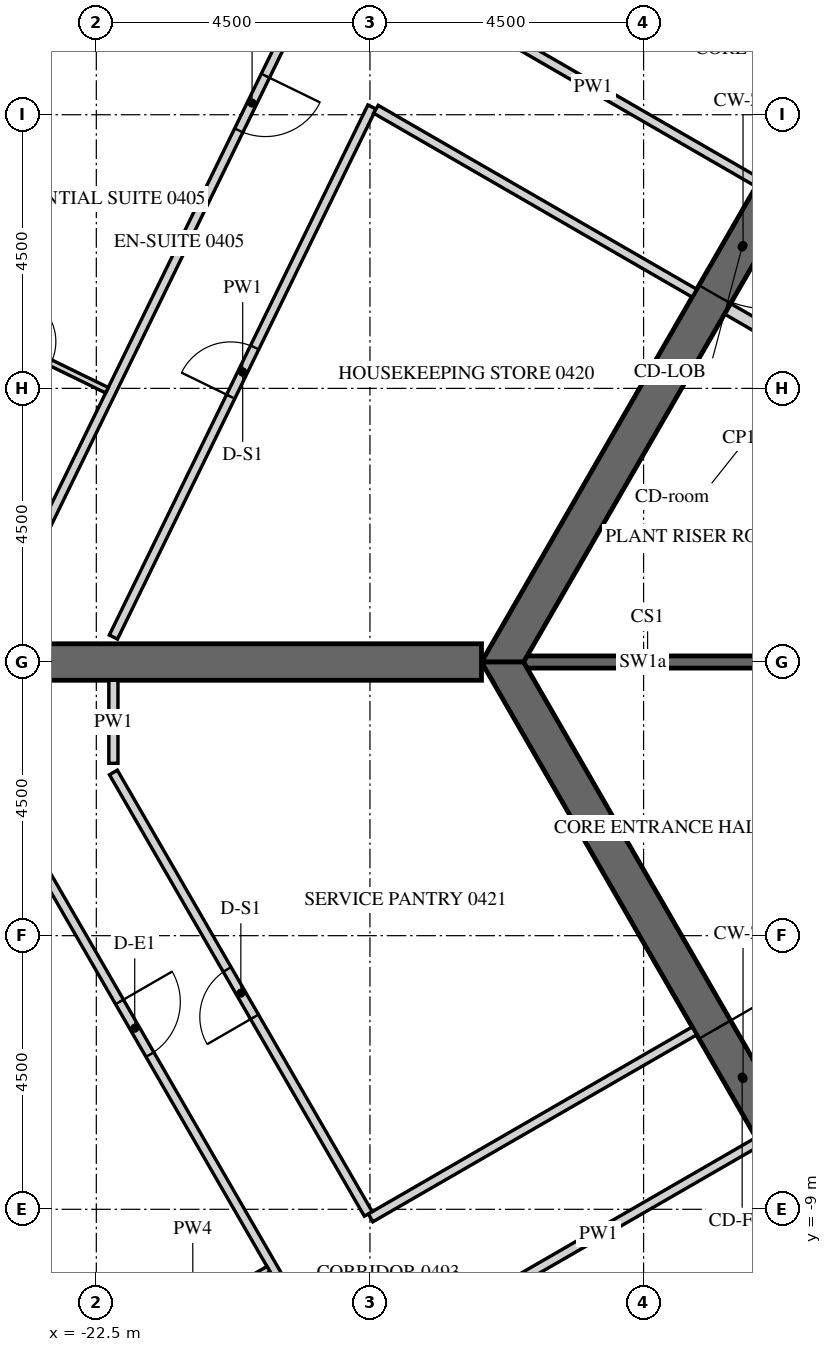
"""IFC4 building model, lengths in metres.
Left out: names, types, materials, properties, quantities, classifications, styles, units other than length and angle.
Written with IfcOpenShell. Run it as: python <this file> out.ifc"""

import sys

from ifc_helpers import new_model, si_unit, direction, frame, frame_2d, origin, place, context, subcontext, project, spatial, polyline, rectangle, outline, extrude, element, fill, save


model = new_model("IFC4")
c1 = context("Model", 3, precision=1e-05, world=origin(), true_north=direction((0.0, 1.0)))
c2 = subcontext(c1, "Body", "Model", "MODEL_VIEW")
j1 = project(units=[si_unit("LENGTHUNIT", "METRE"), si_unit("PLANEANGLEUNIT", "RADIAN")], contexts=[c1])
p1 = place(None, origin())
s1 = spatial("IfcSite", under=j1, at=p1, CompositionType="ELEMENT")
p2 = place(p1, origin())
s2 = spatial("IfcBuilding", under=s1, at=p2, CompositionType="ELEMENT")
p3 = place(p2, frame((0.0, 0.0, 68.7)))
s3 = spatial("IfcBuildingStorey", under=s2, at=p3, CompositionType="ELEMENT", Elevation=68.7)
p4 = place(p3, frame((-19.595, 27.633, -0.15), z_axis=(0.0, 0.0, 1.0), x_axis=(-0.438368285794, -0.898795441694, 0.0)))
e1 = element("IfcWall", 1, at=p4, inside=s3, PredefinedType="SOLIDWALL", context=c2, shape_type="SweptSolid", body=[
    extrude(outline(polyline([(-0.026, -0.275), (30.093, -0.275), (30.048, 0.275), (0.026, 0.275), (-0.026, -0.275)])), origin(), (0.0, 0.0, 1.0), 3.9),
])
p5 = place(p4, frame((1.236, 0.0, 1.05)))
e2 = element("IfcOpeningElement", 2, at=p5, cuts=e1, PredefinedType="OPENING", context=c2, shape_type="SweptSolid", body=[
    extrude(rectangle(XDim=2.4, YDim=2.4, at=frame_2d((1.2, 1.2))), frame((0.0, 0.285, 0.0), z_axis=(0.0, -1.0, 0.0), x_axis=(1.0, 0.0, 0.0)), (0.0, 0.0, 1.0), 0.57),
])
p6 = place(p4, frame((4.835, 0.0, 1.05)))
e3 = element("IfcOpeningElement", 3, at=p6, cuts=e1, PredefinedType="OPENING", context=c2, shape_type="SweptSolid", body=[
    extrude(rectangle(XDim=2.4, YDim=2.4, at=frame_2d((1.2, 1.2))), frame((0.0, 0.285, 0.0), z_axis=(0.0, -1.0, 0.0), x_axis=(1.0, 0.0, 0.0)), (0.0, 0.0, 1.0), 0.57),
])
p7 = place(p4, frame((8.436, 0.0, 1.05)))
e4 = element("IfcOpeningElement", 4, at=p7, cuts=e1, PredefinedType="OPENING", context=c2, shape_type="SweptSolid", body=[
    extrude(rectangle(XDim=2.4, YDim=2.4, at=frame_2d((1.2, 1.2))), frame((0.0, 0.285, 0.0), z_axis=(0.0, -1.0, 0.0), x_axis=(1.0, 0.0, 0.0)), (0.0, 0.0, 1.0), 0.57),
])
p8 = place(p4, frame((12.035, 0.0, 1.05)))
e5 = element("IfcOpeningElement", 5, at=p8, cuts=e1, PredefinedType="OPENING", context=c2, shape_type="SweptSolid", body=[
    extrude(rectangle(XDim=2.4, YDim=2.4, at=frame_2d((1.2, 1.2))), frame((0.0, 0.285, 0.0), z_axis=(0.0, -1.0, 0.0), x_axis=(1.0, 0.0, 0.0)), (0.0, 0.0, 1.0), 0.57),
])
p9 = place(p4, frame((15.635, 0.0, 1.05)))
e6 = element("IfcOpeningElement", 6, at=p9, cuts=e1, PredefinedType="OPENING", context=c2, shape_type="SweptSolid", body=[
    extrude(rectangle(XDim=2.4, YDim=2.4, at=frame_2d((1.2, 1.2))), frame((0.0, 0.285, 0.0), z_axis=(0.0, -1.0, 0.0), x_axis=(1.0, 0.0, 0.0)), (0.0, 0.0, 1.0), 0.57),
])
p10 = place(p4, frame((19.236, 0.0, 1.05)))
e7 = element("IfcOpeningElement", 7, at=p10, cuts=e1, PredefinedType="OPENING", context=c2, shape_type="SweptSolid", body=[
    extrude(rectangle(XDim=2.4, YDim=2.4, at=frame_2d((1.2, 1.2))), frame((0.0, 0.285, 0.0), z_axis=(0.0, -1.0, 0.0), x_axis=(1.0, 0.0, 0.0)), (0.0, 0.0, 1.0), 0.57),
])
p11 = place(p4, frame((22.835, 0.0, 1.05)))
e8 = element("IfcOpeningElement", 8, at=p11, cuts=e1, PredefinedType="OPENING", context=c2, shape_type="SweptSolid", body=[
    extrude(rectangle(XDim=2.4, YDim=2.4, at=frame_2d((1.2, 1.2))), frame((0.0, 0.285, 0.0), z_axis=(0.0, -1.0, 0.0), x_axis=(1.0, 0.0, 0.0)), (0.0, 0.0, 1.0), 0.57),
])
p12 = place(p4, frame((26.436, 0.0, 1.05)))
e9 = element("IfcOpeningElement", 9, at=p12, cuts=e1, PredefinedType="OPENING", context=c2, shape_type="SweptSolid", body=[
    extrude(rectangle(XDim=2.4, YDim=2.4, at=frame_2d((1.2, 1.2))), frame((0.0, 0.285, 0.0), z_axis=(0.0, -1.0, 0.0), x_axis=(1.0, 0.0, 0.0)), (0.0, 0.0, 1.0), 0.57),
])
p13 = place(p3, frame((-32.655, -2.89, -0.15), z_axis=(0.0, 0.0, 1.0), x_axis=(0.499997711317, -0.866026725152, 0.0)))
e10 = element("IfcWall", 10, at=p13, inside=s3, PredefinedType="SOLIDWALL", context=c2, shape_type="SweptSolid", body=[
    extrude(outline(polyline([(-0.022, -0.275), (30.097, -0.275), (30.045, 0.275), (0.022, 0.275), (-0.022, -0.275)])), origin(), (0.0, 0.0, 1.0), 3.9),
])
p14 = place(p13, frame((1.236, 0.0, 1.05)))
e11 = element("IfcOpeningElement", 11, at=p14, cuts=e10, PredefinedType="OPENING", context=c2, shape_type="SweptSolid", body=[
    extrude(rectangle(XDim=2.4, YDim=2.4, at=frame_2d((1.2, 1.2))), frame((0.0, 0.285, 0.0), z_axis=(0.0, -1.0, 0.0), x_axis=(1.0, 0.0, 0.0)), (0.0, 0.0, 1.0), 0.57),
])
p15 = place(p13, frame((4.835, 0.0, 1.05)))
e12 = element("IfcOpeningElement", 12, at=p15, cuts=e10, PredefinedType="OPENING", context=c2, shape_type="SweptSolid", body=[
    extrude(rectangle(XDim=2.4, YDim=2.4, at=frame_2d((1.2, 1.2))), frame((0.0, 0.285, 0.0), z_axis=(0.0, -1.0, 0.0), x_axis=(1.0, 0.0, 0.0)), (0.0, 0.0, 1.0), 0.57),
])
p16 = place(p13, frame((8.436, 0.0, 1.05)))
e13 = element("IfcOpeningElement", 13, at=p16, cuts=e10, PredefinedType="OPENING", context=c2, shape_type="SweptSolid", body=[
    extrude(rectangle(XDim=2.4, YDim=2.4, at=frame_2d((1.2, 1.2))), frame((0.0, 0.285, 0.0), z_axis=(0.0, -1.0, 0.0), x_axis=(1.0, 0.0, 0.0)), (0.0, 0.0, 1.0), 0.57),
])
p17 = place(p13, frame((12.035, 0.0, 1.05)))
e14 = element("IfcOpeningElement", 14, at=p17, cuts=e10, PredefinedType="OPENING", context=c2, shape_type="SweptSolid", body=[
    extrude(rectangle(XDim=2.4, YDim=2.4, at=frame_2d((1.2, 1.2))), frame((0.0, 0.285, 0.0), z_axis=(0.0, -1.0, 0.0), x_axis=(1.0, 0.0, 0.0)), (0.0, 0.0, 1.0), 0.57),
])
p18 = place(p13, frame((15.635, 0.0, 1.05)))
e15 = element("IfcOpeningElement", 15, at=p18, cuts=e10, PredefinedType="OPENING", context=c2, shape_type="SweptSolid", body=[
    extrude(rectangle(XDim=2.4, YDim=2.4, at=frame_2d((1.2, 1.2))), frame((0.0, 0.285, 0.0), z_axis=(0.0, -1.0, 0.0), x_axis=(1.0, 0.0, 0.0)), (0.0, 0.0, 1.0), 0.57),
])
p19 = place(p13, frame((19.236, 0.0, 1.05)))
e16 = element("IfcOpeningElement", 16, at=p19, cuts=e10, PredefinedType="OPENING", context=c2, shape_type="SweptSolid", body=[
    extrude(rectangle(XDim=2.4, YDim=2.4, at=frame_2d((1.2, 1.2))), frame((0.0, 0.285, 0.0), z_axis=(0.0, -1.0, 0.0), x_axis=(1.0, 0.0, 0.0)), (0.0, 0.0, 1.0), 0.57),
])
p20 = place(p13, frame((22.835, 0.0, 1.05)))
e17 = element("IfcOpeningElement", 17, at=p20, cuts=e10, PredefinedType="OPENING", context=c2, shape_type="SweptSolid", body=[
    extrude(rectangle(XDim=2.4, YDim=2.4, at=frame_2d((1.2, 1.2))), frame((0.0, 0.285, 0.0), z_axis=(0.0, -1.0, 0.0), x_axis=(1.0, 0.0, 0.0)), (0.0, 0.0, 1.0), 0.57),
])
p21 = place(p13, frame((26.436, 0.0, 1.05)))
e18 = element("IfcOpeningElement", 18, at=p21, cuts=e10, PredefinedType="OPENING", context=c2, shape_type="SweptSolid", body=[
    extrude(rectangle(XDim=2.4, YDim=2.4, at=frame_2d((1.2, 1.2))), frame((0.0, 0.285, 0.0), z_axis=(0.0, -1.0, 0.0), x_axis=(1.0, 0.0, 0.0)), (0.0, 0.0, 1.0), 0.57),
])
p22 = place(p3, frame((-7.91, 13.7, -0.15), z_axis=(0.0, 0.0, 1.0), x_axis=(-0.499999880136, -0.866025472988, 0.0)))
e19 = element("IfcWall", 19, at=p22, inside=s3, PredefinedType="SHEAR", context=c2, shape_type="SweptSolid", body=[
    extrude(outline(polyline([(-0.173, -0.3), (15.993, -0.3), (15.646, 0.3), (0.173, 0.3), (-0.173, -0.3)])), origin(), (0.0, 0.0, 1.0), 3.9),
])
p23 = place(p22, frame((7.039, 0.0, 0.15)))
e20 = element("IfcOpeningElement", 20, at=p23, cuts=e19, PredefinedType="OPENING", context=c2, shape_type="SweptSolid", body=[
    extrude(rectangle(XDim=1.8, YDim=2.4, at=frame_2d((0.9, 1.2))), frame((0.0, 0.31, 0.0), z_axis=(0.0, -1.0, 0.0), x_axis=(1.0, 0.0, 0.0)), (0.0, 0.0, 1.0), 0.62),
])
p24 = place(p3, frame((-15.819, 0.0, -0.15), z_axis=(0.0, 0.0, 1.0), x_axis=(0.499999880136, -0.866025472988, 0.0)))
e21 = element("IfcWall", 21, at=p24, inside=s3, PredefinedType="SHEAR", context=c2, shape_type="SweptSolid", body=[
    extrude(outline(polyline([(-0.173, -0.3), (15.993, -0.3), (15.646, 0.3), (0.173, 0.3), (-0.173, -0.3)])), origin(), (0.0, 0.0, 1.0), 3.9),
])
p25 = place(p24, frame((6.981, 0.0, 0.15)))
e22 = element("IfcOpeningElement", 22, at=p25, cuts=e21, PredefinedType="OPENING", context=c2, shape_type="SweptSolid", body=[
    extrude(rectangle(XDim=1.8, YDim=2.4, at=frame_2d((0.9, 1.2))), frame((0.0, 0.31, 0.0), z_axis=(0.0, -1.0, 0.0), x_axis=(1.0, 0.0, 0.0)), (0.0, 0.0, 1.0), 0.62),
])
p26 = place(p3, frame((-16.166, 0.0, -0.15), z_axis=(0.0, 0.0, 1.0), x_axis=(-1.0, 0.0, 0.0)))
e23 = element("IfcWall", 23, at=p26, inside=s3, PredefinedType="SHEAR", context=c2, shape_type="SweptSolid", body=[
    extrude(rectangle(XDim=16.509, YDim=0.6, at=frame_2d((8.254, 0.0))), origin(), (0.0, 0.0, 1.0), 3.9),
])
p27 = place(p26, frame((7.354, 0.0, 0.15)))
e24 = element("IfcOpeningElement", 24, at=p27, cuts=e23, PredefinedType="OPENING", context=c2, shape_type="SweptSolid", body=[
    extrude(rectangle(XDim=1.8, YDim=2.4, at=frame_2d((0.9, 1.2))), frame((0.0, 0.31, 0.0), z_axis=(0.0, -1.0, 0.0), x_axis=(1.0, 0.0, 0.0)), (0.0, 0.0, 1.0), 0.62),
])
p28 = place(p3, frame((-11.547, 0.0, -0.15), z_axis=(0.0, 0.0, 1.0), x_axis=(-1.0, 0.0, 0.0)))
e25 = element("IfcWall", 25, at=p28, inside=s3, PredefinedType="SHEAR", context=c2, shape_type="SweptSolid", body=[
    extrude(rectangle(XDim=3.926, YDim=0.2, at=frame_2d((1.963, 0.0))), origin(), (0.0, 0.0, 1.0), 3.9),
])
p29 = place(p3, frame((-9.175, 4.109, 0.0), z_axis=(0.0, 0.0, 1.0), x_axis=(-0.865989465428, 0.500062241894, 0.0)))
e26 = element("IfcWall", 26, at=p29, inside=s3, PredefinedType="PARTITIONING", context=c2, shape_type="SweptSolid", body=[
    extrude(rectangle(XDim=3.4, YDim=0.2, at=frame_2d((1.7, 0.0))), origin(), (0.0, 0.0, 1.0), 3.65),
])
p30 = place(p29, frame((1.351, 0.0, 0.0)))
e27 = element("IfcOpeningElement", 27, at=p30, cuts=e26, PredefinedType="OPENING", context=c2, shape_type="SweptSolid", body=[
    extrude(rectangle(XDim=0.9, YDim=2.1, at=frame_2d((0.45, 1.05))), frame((0.0, 0.11, 0.0), z_axis=(0.0, -1.0, 0.0), x_axis=(1.0, 0.0, 0.0)), (0.0, 0.0, 1.0), 0.22),
])
p31 = place(p3, frame((-13.752, 21.875, 0.0), z_axis=(0.0, 0.0, 1.0), x_axis=(-0.438374473378, -0.898792423806, 0.0)))
e28 = element("IfcWall", 28, at=p31, inside=s3, PredefinedType="PARTITIONING", context=c2, shape_type="SweptSolid", body=[
    extrude(rectangle(XDim=21.918, YDim=0.15, at=frame_2d((10.959, 0.0))), origin(), (0.0, 0.0, 1.0), 2.988),
])
p32 = place(p31, frame((0.371, 0.0, 0.0)))
e29 = element("IfcOpeningElement", 29, at=p32, cuts=e28, PredefinedType="OPENING", context=c2, shape_type="SweptSolid", body=[
    extrude(rectangle(XDim=1.0, YDim=2.1, at=frame_2d((0.5, 1.05))), frame((0.0, 0.085, 0.0), z_axis=(0.0, -1.0, 0.0), x_axis=(1.0, 0.0, 0.0)), (0.0, 0.0, 1.0), 0.17),
])
p33 = place(p31, frame((6.171, 0.0, 0.0)))
e30 = element("IfcOpeningElement", 30, at=p33, cuts=e28, PredefinedType="OPENING", context=c2, shape_type="SweptSolid", body=[
    extrude(rectangle(XDim=1.0, YDim=2.1, at=frame_2d((0.5, 1.05))), frame((0.0, 0.085, 0.0), z_axis=(0.0, -1.0, 0.0), x_axis=(1.0, 0.0, 0.0)), (0.0, 0.0, 1.0), 0.17),
])
p34 = place(p31, frame((13.612, 0.0, 0.0)))
e31 = element("IfcOpeningElement", 31, at=p34, cuts=e28, PredefinedType="OPENING", context=c2, shape_type="SweptSolid", body=[
    extrude(rectangle(XDim=1.0, YDim=2.1, at=frame_2d((0.5, 1.05))), frame((0.0, 0.085, 0.0), z_axis=(0.0, -1.0, 0.0), x_axis=(1.0, 0.0, 0.0)), (0.0, 0.0, 1.0), 0.17),
])
p35 = place(p3, frame((-11.614, 7.884, 0.0), z_axis=(0.0, 0.0, 1.0), x_axis=(-0.866025438137, 0.4999999405, 0.0)))
e32 = element("IfcWall", 32, at=p35, inside=s3, PredefinedType="PARTITIONING", context=c2, shape_type="SweptSolid", body=[
    extrude(rectangle(XDim=6.271, YDim=0.15, at=frame_2d((3.135, 0.0))), origin(), (0.0, 0.0, 1.0), 2.988),
])
p36 = place(p3, frame((-22.219, 0.41, 0.0), z_axis=(0.0, 0.0, 1.0), x_axis=(0.438391891827, 0.898783927972, 0.0)))
e33 = element("IfcWall", 33, at=p36, inside=s3, PredefinedType="PARTITIONING", context=c2, shape_type="SweptSolid", body=[
    extrude(rectangle(XDim=9.699, YDim=0.15, at=frame_2d((4.85, 0.0))), origin(), (0.0, 0.0, 1.0), 2.988),
])
p37 = place(p36, frame((4.4, 0.0, 0.0)))
e34 = element("IfcOpeningElement", 34, at=p37, cuts=e33, PredefinedType="OPENING", context=c2, shape_type="SweptSolid", body=[
    extrude(rectangle(XDim=0.9, YDim=2.1, at=frame_2d((0.45, 1.05))), frame((0.0, 0.085, 0.0), z_axis=(0.0, -1.0, 0.0), x_axis=(1.0, 0.0, 0.0)), (0.0, 0.0, 1.0), 0.17),
])
p38 = place(p3, frame((-17.902, 9.09, 0.0), z_axis=(0.0, 0.0, 1.0), x_axis=(0.866036368755, -0.499981007633, 0.0)))
e35 = element("IfcWall", 35, at=p38, inside=s3, PredefinedType="PARTITIONING", context=c2, shape_type="SweptSolid", body=[
    extrude(rectangle(XDim=6.049, YDim=0.15, at=frame_2d((3.024, 0.0))), origin(), (0.0, 0.0, 1.0), 2.988),
])
p39 = place(p3, frame((-24.09, -2.175, 0.0), z_axis=(0.0, 0.0, 1.0), x_axis=(0.499996832073, -0.86602723278, 0.0)))
e36 = element("IfcWall", 36, at=p39, inside=s3, PredefinedType="PARTITIONING", context=c2, shape_type="SweptSolid", body=[
    extrude(rectangle(XDim=23.877, YDim=0.15, at=frame_2d((11.938, 0.0))), origin(), (0.0, 0.0, 1.0), 2.988),
])
p40 = place(p39, frame((3.943, 0.0, 0.0)))
e37 = element("IfcOpeningElement", 37, at=p40, cuts=e36, PredefinedType="OPENING", context=c2, shape_type="SweptSolid", body=[
    extrude(rectangle(XDim=1.0, YDim=2.1, at=frame_2d((0.5, 1.05))), frame((0.0, 0.085, 0.0), z_axis=(0.0, -1.0, 0.0), x_axis=(1.0, 0.0, 0.0)), (0.0, 0.0, 1.0), 0.17),
])
p41 = place(p39, frame((15.672, 0.0, 0.0)))
e38 = element("IfcOpeningElement", 38, at=p41, cuts=e36, PredefinedType="OPENING", context=c2, shape_type="SweptSolid", body=[
    extrude(rectangle(XDim=1.0, YDim=2.1, at=frame_2d((0.5, 1.05))), frame((0.0, 0.085, 0.0), z_axis=(0.0, -1.0, 0.0), x_axis=(1.0, 0.0, 0.0)), (0.0, 0.0, 1.0), 0.17),
])
p42 = place(p39, frame((19.525, 0.0, 0.0)))
e39 = element("IfcOpeningElement", 39, at=p42, cuts=e36, PredefinedType="OPENING", context=c2, shape_type="SweptSolid", body=[
    extrude(rectangle(XDim=1.0, YDim=2.1, at=frame_2d((0.5, 1.05))), frame((0.0, 0.085, 0.0), z_axis=(0.0, -1.0, 0.0), x_axis=(1.0, 0.0, 0.0)), (0.0, 0.0, 1.0), 0.17),
])
p43 = place(p3, frame((-12.664, -6.066, 0.0), z_axis=(0.0, 0.0, 1.0), x_axis=(-0.866023618125, -0.500003092839, 0.0)))
e40 = element("IfcWall", 40, at=p43, inside=s3, PredefinedType="PARTITIONING", context=c2, shape_type="SweptSolid", body=[
    extrude(rectangle(XDim=6.15, YDim=0.15, at=frame_2d((3.075, 0.0))), origin(), (0.0, 0.0, 1.0), 2.988),
])
p44 = place(p3, frame((-18.027, -9.076, 0.0), z_axis=(0.0, 0.0, 1.0), x_axis=(-0.500007318041, 0.86602117867, 0.0)))
e41 = element("IfcWall", 41, at=p44, inside=s3, PredefinedType="PARTITIONING", context=c2, shape_type="SweptSolid", body=[
    extrude(rectangle(XDim=8.383, YDim=0.15, at=frame_2d((4.191, 0.0))), origin(), (0.0, 0.0, 1.0), 2.988),
])
p45 = place(p44, frame((3.742, 0.0, 0.0)))
e42 = element("IfcOpeningElement", 42, at=p45, cuts=e41, PredefinedType="OPENING", context=c2, shape_type="SweptSolid", body=[
    extrude(rectangle(XDim=0.9, YDim=2.1, at=frame_2d((0.45, 1.05))), frame((0.0, 0.085, 0.0), z_axis=(0.0, -1.0, 0.0), x_axis=(1.0, 0.0, 0.0)), (0.0, 0.0, 1.0), 0.17),
])
p46 = place(p3, frame((-22.219, -1.666, 0.0), z_axis=(0.0, 0.0, 1.0), x_axis=(0.0, 1.0, 0.0)))
e43 = element("IfcWall", 43, at=p46, inside=s3, PredefinedType="PARTITIONING", context=c2, shape_type="SweptSolid", body=[
    extrude(rectangle(XDim=1.366, YDim=0.15, at=frame_2d((0.683, 0.0))), origin(), (0.0, 0.0, 1.0), 2.988),
])
p47 = place(p3, frame((-16.875, -10.922, 0.0), z_axis=(0.0, 0.0, 1.0), x_axis=(0.866023634079, 0.500003065207, 0.0)))
e44 = element("IfcWall", 44, at=p47, inside=s3, PredefinedType="PARTITIONING", context=c2, shape_type="SweptSolid", body=[
    extrude(rectangle(XDim=6.075, YDim=0.15, at=frame_2d((3.038, 0.0))), origin(), (0.0, 0.0, 1.0), 2.988),
])
p48 = place(p3, frame((-24.954, 5.752, 0.0), z_axis=(0.0, 0.0, 1.0), x_axis=(0.89880694479, -0.438344699976, 0.0)))
e45 = element("IfcWall", 45, at=p48, inside=s3, PredefinedType="PARTITIONING", context=c2, shape_type="SweptSolid", body=[
    extrude(rectangle(XDim=2.925, YDim=0.1, at=frame_2d((1.462, 0.0))), origin(), (0.0, 0.0, 1.0), 2.988),
])
p49 = place(p48, frame((1.1, 0.0, 0.0)))
e46 = element("IfcOpeningElement", 46, at=p49, cuts=e45, PredefinedType="OPENING", context=c2, shape_type="SweptSolid", body=[
    extrude(rectangle(XDim=0.8, YDim=2.1, at=frame_2d((0.4, 1.05))), frame((0.0, 0.06, 0.0), z_axis=(0.0, -1.0, 0.0), x_axis=(1.0, 0.0, 0.0)), (0.0, 0.0, 1.0), 0.12),
])
p50 = place(p3, frame((-21.973, 15.97, 0.0), z_axis=(0.0, 0.0, 1.0), x_axis=(-0.438360036982, -0.898799464829, 0.0)))
e47 = element("IfcWall", 47, at=p50, inside=s3, PredefinedType="PARTITIONING", context=c2, shape_type="SweptSolid", body=[
    extrude(rectangle(XDim=7.11, YDim=0.1, at=frame_2d((3.555, 0.0))), origin(), (0.0, 0.0, 1.0), 2.988),
])
p51 = place(p50, frame((3.06, 0.0, 0.0)))
e48 = element("IfcOpeningElement", 48, at=p51, cuts=e47, PredefinedType="OPENING", context=c2, shape_type="SweptSolid", body=[
    extrude(rectangle(XDim=0.9, YDim=2.1, at=frame_2d((0.45, 1.05))), frame((0.0, 0.06, 0.0), z_axis=(0.0, -1.0, 0.0), x_axis=(1.0, 0.0, 0.0)), (0.0, 0.0, 1.0), 0.12),
])
p52 = place(p3, frame((-22.158, -11.42, 0.0), z_axis=(0.0, 0.0, 1.0), x_axis=(0.866018712932, 0.500011588718, 0.0)))
e49 = element("IfcWall", 49, at=p52, inside=s3, PredefinedType="PARTITIONING", context=c2, shape_type="SweptSolid", body=[
    extrude(rectangle(XDim=2.875, YDim=0.1, at=frame_2d((1.438, 0.0))), origin(), (0.0, 0.0, 1.0), 2.988),
])
p53 = place(p52, frame((1.05, 0.0, 0.0)))
e50 = element("IfcOpeningElement", 50, at=p53, cuts=e49, PredefinedType="OPENING", context=c2, shape_type="SweptSolid", body=[
    extrude(rectangle(XDim=0.8, YDim=2.1, at=frame_2d((0.4, 1.05))), frame((0.0, 0.06, 0.0), z_axis=(0.0, -1.0, 0.0), x_axis=(1.0, 0.0, 0.0)), (0.0, 0.0, 1.0), 0.12),
])
p54 = place(p23, origin())
e51 = element("IfcDoor", 51, at=p54, inside=s3, OperationType="DOUBLE_DOOR_SINGLE_SWING", PredefinedType="DOOR", context=c2, shape_type="SweptSolid", body=[
    extrude(rectangle(XDim=1.8, YDim=2.4, at=frame_2d((0.9, 1.2))), frame((0.0, 0.025, 0.0), z_axis=(0.0, -1.0, 0.0), x_axis=(1.0, 0.0, 0.0)), (0.0, 0.0, 1.0), 0.05),
])
fill(e20, e51)
p55 = place(p25, origin())
e52 = element("IfcDoor", 52, at=p55, inside=s3, OperationType="DOUBLE_DOOR_SINGLE_SWING", PredefinedType="DOOR", context=c2, shape_type="SweptSolid", body=[
    extrude(rectangle(XDim=1.8, YDim=2.4, at=frame_2d((0.9, 1.2))), frame((0.0, 0.025, 0.0), z_axis=(0.0, -1.0, 0.0), x_axis=(1.0, 0.0, 0.0)), (0.0, 0.0, 1.0), 0.05),
])
fill(e22, e52)
p56 = place(p34, origin())
e53 = element("IfcDoor", 53, at=p56, inside=s3, OperationType="SINGLE_SWING_LEFT", PredefinedType="DOOR", context=c2, shape_type="SweptSolid", body=[
    extrude(rectangle(XDim=1.0, YDim=2.1, at=frame_2d((0.5, 1.05))), frame((0.0, 0.025, 0.0), z_axis=(0.0, -1.0, 0.0), x_axis=(1.0, 0.0, 0.0)), (0.0, 0.0, 1.0), 0.05),
])
fill(e31, e53)
p57 = place(p40, origin())
e54 = element("IfcDoor", 54, at=p57, inside=s3, OperationType="SINGLE_SWING_RIGHT", PredefinedType="DOOR", context=c2, shape_type="SweptSolid", body=[
    extrude(rectangle(XDim=1.0, YDim=2.1, at=frame_2d((0.5, 1.05))), frame((0.0, 0.025, 0.0), z_axis=(0.0, -1.0, 0.0), x_axis=(1.0, 0.0, 0.0)), (0.0, 0.0, 1.0), 0.05),
])
fill(e37, e54)
p58 = place(p37, origin())
e55 = element("IfcDoor", 55, at=p58, inside=s3, OperationType="SINGLE_SWING_LEFT", PredefinedType="DOOR", context=c2, shape_type="SweptSolid", body=[
    extrude(rectangle(XDim=0.9, YDim=2.1, at=frame_2d((0.45, 1.05))), frame((0.0, 0.025, 0.0), z_axis=(0.0, -1.0, 0.0), x_axis=(1.0, 0.0, 0.0)), (0.0, 0.0, 1.0), 0.05),
])
fill(e34, e55)
p59 = place(p45, origin())
e56 = element("IfcDoor", 56, at=p59, inside=s3, OperationType="SINGLE_SWING_RIGHT", PredefinedType="DOOR", context=c2, shape_type="SweptSolid", body=[
    extrude(rectangle(XDim=0.9, YDim=2.1, at=frame_2d((0.45, 1.05))), frame((0.0, 0.025, 0.0), z_axis=(0.0, -1.0, 0.0), x_axis=(1.0, 0.0, 0.0)), (0.0, 0.0, 1.0), 0.05),
])
fill(e42, e56)
save(model, sys.argv[1])
